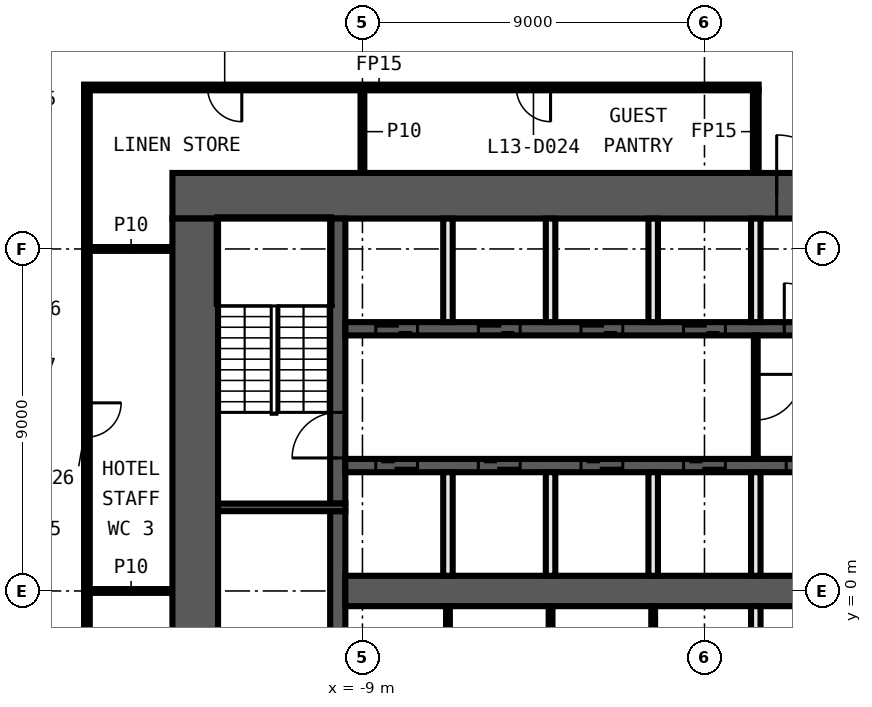
"""IFC4 building model, lengths in metres.
Left out: names, types, materials, properties, quantities, classifications, styles, units other than length and angle.
Written with IfcOpenShell. Run it as: python <this file> out.ifc"""

import sys

from ifc_helpers import new_model, si_unit, direction, frame, frame_2d, origin, place, context, subcontext, project, spatial, rectangle, extrude, element, fill, save


model = new_model("IFC4")
c1 = context("Model", 3, precision=1e-05, world=origin(), true_north=direction((0.0, 1.0)))
c2 = subcontext(c1, "Body", "Model", "MODEL_VIEW")
j1 = project(units=[si_unit("LENGTHUNIT", "METRE"), si_unit("PLANEANGLEUNIT", "RADIAN")], contexts=[c1])
p1 = place(None, origin())
s1 = spatial("IfcSite", under=j1, at=p1, CompositionType="ELEMENT")
p2 = place(p1, origin())
s2 = spatial("IfcBuilding", under=s1, at=p2, CompositionType="ELEMENT")
p3 = place(p2, frame((0.0, 0.0, 69.9)))
s3 = spatial("IfcBuildingStorey", under=s2, at=p3, CompositionType="ELEMENT", Elevation=69.9)
for number, where, z_axis, x_axis in (
    (1, (-16.175, 0.0, 0.0), (0.0, 0.0, 1.0), (1.0, 0.0, 0.0)),
    (2, (-16.175, 9.0, 0.0), (0.0, 0.0, 1.0), (1.0, 0.0, 0.0)),
):
    element("IfcWall", number, at=place(p3, frame(where, z_axis=z_axis, x_axis=x_axis)), inside=s3, PredefinedType="PARTITIONING", context=c2, shape_type="SweptSolid", body=[
        extrude(rectangle(XDim=2.175, YDim=0.1, at=frame_2d((1.087, 0.0))), origin(), (0.0, 0.0, 1.0), 3.3),
    ])
p4 = place(p3, frame((1.425, 13.25, 0.0), z_axis=(0.0, 0.0, 1.0), x_axis=(-1.0, 0.0, 0.0)))
e3 = element("IfcWall", 3, at=p4, inside=s3, PredefinedType="PARTITIONING", context=c2, shape_type="SweptSolid", body=[
    extrude(rectangle(XDim=17.75, YDim=0.15, at=frame_2d((8.875, 0.0))), origin(), (0.0, 0.0, 1.0), 3.3),
])
p5 = place(p4, frame((5.475, 0.0, 0.0)))
e4 = element("IfcOpeningElement", 4, at=p5, cuts=e3, PredefinedType="OPENING", context=c2, shape_type="SweptSolid", body=[
    extrude(rectangle(XDim=0.9, YDim=2.1, at=frame_2d((0.45, 1.05))), frame((0.0, 0.085, 0.0), z_axis=(0.0, -1.0, 0.0), x_axis=(1.0, 0.0, 0.0)), (0.0, 0.0, 1.0), 0.17),
])
p6 = place(p4, frame((13.6, 0.0, 0.0)))
e5 = element("IfcOpeningElement", 5, at=p6, cuts=e3, PredefinedType="OPENING", context=c2, shape_type="SweptSolid", body=[
    extrude(rectangle(XDim=0.9, YDim=2.1, at=frame_2d((0.45, 1.05))), frame((0.0, 0.085, 0.0), z_axis=(0.0, -1.0, 0.0), x_axis=(1.0, 0.0, 0.0)), (0.0, 0.0, 1.0), 0.17),
])
p7 = place(p3, frame((1.35, 11.0, 0.0), z_axis=(0.0, 0.0, 1.0), x_axis=(0.0, 1.0, 0.0)))
e6 = element("IfcWall", 6, at=p7, inside=s3, PredefinedType="PARTITIONING", context=c2, shape_type="SweptSolid", body=[
    extrude(rectangle(XDim=2.175, YDim=0.15, at=frame_2d((1.087, 0.0))), origin(), (0.0, 0.0, 1.0), 3.3),
])
p8 = place(p3, frame((-9.0, 11.0, 0.0), z_axis=(0.0, 0.0, 1.0), x_axis=(0.0, 1.0, 0.0)))
e7 = element("IfcWall", 7, at=p8, inside=s3, PredefinedType="PARTITIONING", context=c2, shape_type="SweptSolid", body=[
    extrude(rectangle(XDim=2.175, YDim=0.1, at=frame_2d((1.087, 0.0))), origin(), (0.0, 0.0, 1.0), 3.3),
])
p9 = place(p3, frame((-16.25, 13.175, 0.0), z_axis=(0.0, 0.0, 1.0), x_axis=(0.0, -1.0, 0.0)))
e8 = element("IfcWall", 8, at=p9, inside=s3, PredefinedType="PARTITIONING", context=c2, shape_type="SweptSolid", body=[
    extrude(rectangle(XDim=26.35, YDim=0.15, at=frame_2d((13.175, 0.0))), origin(), (0.0, 0.0, 1.0), 3.3),
])
p10 = place(p9, frame((17.225, 0.0, 0.0)))
e9 = element("IfcOpeningElement", 9, at=p10, cuts=e8, PredefinedType="OPENING", context=c2, shape_type="SweptSolid", body=[
    extrude(rectangle(XDim=0.9, YDim=2.1, at=frame_2d((0.45, 1.05))), frame((0.0, 0.085, 0.0), z_axis=(0.0, -1.0, 0.0), x_axis=(1.0, 0.0, 0.0)), (0.0, 0.0, 1.0), 0.17),
])
p11 = place(p9, frame((8.225, 0.0, 0.0)))
e10 = element("IfcOpeningElement", 10, at=p11, cuts=e8, PredefinedType="OPENING", context=c2, shape_type="SweptSolid", body=[
    extrude(rectangle(XDim=0.9, YDim=2.1, at=frame_2d((0.45, 1.05))), frame((0.0, 0.085, 0.0), z_axis=(0.0, -1.0, 0.0), x_axis=(1.0, 0.0, 0.0)), (0.0, 0.0, 1.0), 0.17),
])
p12 = place(p3, frame((-14.0, 10.4, 0.0), z_axis=(0.0, 0.0, 1.0), x_axis=(1.0, 0.0, 0.0)))
e11 = element("IfcWall", 11, at=p12, inside=s3, PredefinedType="SHEAR", context=c2, shape_type="SweptSolid", body=[
    extrude(rectangle(XDim=28.0, YDim=1.2, at=frame_2d((14.0, 0.0))), origin(), (0.0, 0.0, 1.0), 3.3),
])
p13 = place(p12, frame((15.9, 0.0, 0.0)))
e12 = element("IfcOpeningElement", 12, at=p13, cuts=e11, PredefinedType="OPENING", context=c2, shape_type="SweptSolid", body=[
    extrude(rectangle(XDim=1.6, YDim=2.1, at=frame_2d((0.8, 1.05))), frame((0.0, 0.61, 0.0), z_axis=(0.0, -1.0, 0.0), x_axis=(1.0, 0.0, 0.0)), (0.0, 0.0, 1.0), 1.22),
])
p14 = place(p3, frame((-13.4, -9.8, 0.0), z_axis=(0.0, 0.0, 1.0), x_axis=(0.0, 1.0, 0.0)))
e13 = element("IfcWall", 13, at=p14, inside=s3, PredefinedType="SHEAR", context=c2, shape_type="SweptSolid", body=[
    extrude(rectangle(XDim=19.6, YDim=1.2, at=frame_2d((9.8, 0.0))), origin(), (0.0, 0.0, 1.0), 3.3),
])
p15 = place(p3, frame((-9.65, -2.1, 0.0), z_axis=(0.0, 0.0, 1.0), x_axis=(0.0, 1.0, 0.0)))
e14 = element("IfcWall", 14, at=p15, inside=s3, PredefinedType="SHEAR", context=c2, shape_type="SweptSolid", body=[
    extrude(rectangle(XDim=4.2, YDim=0.4, at=frame_2d((2.1, 0.0))), origin(), (0.0, 0.0, 1.0), 3.3),
])
p16 = place(p3, frame((-9.65, 2.3, 0.0), z_axis=(0.0, 0.0, 1.0), x_axis=(0.0, 1.0, 0.0)))
e15 = element("IfcWall", 15, at=p16, inside=s3, PredefinedType="SHEAR", context=c2, shape_type="SweptSolid", body=[
    extrude(rectangle(XDim=7.5, YDim=0.4, at=frame_2d((3.75, 0.0))), origin(), (0.0, 0.0, 1.0), 3.3),
])
p17 = place(p16, frame((1.2, 0.0, 0.0)))
e16 = element("IfcOpeningElement", 16, at=p17, cuts=e15, PredefinedType="OPENING", context=c2, shape_type="SweptSolid", body=[
    extrude(rectangle(XDim=1.2, YDim=2.1, at=frame_2d((0.6, 1.05))), frame((0.0, 0.21, 0.0), z_axis=(0.0, -1.0, 0.0), x_axis=(1.0, 0.0, 0.0)), (0.0, 0.0, 1.0), 0.42),
])
p18 = place(p3, frame((-9.45, 2.2, 0.0), z_axis=(0.0, 0.0, 1.0), x_axis=(-1.0, 0.0, 0.0)))
e17 = element("IfcWall", 17, at=p18, inside=s3, PredefinedType="SHEAR", context=c2, shape_type="SweptSolid", body=[
    extrude(rectangle(XDim=3.35, YDim=0.2, at=frame_2d((1.675, 0.0))), origin(), (0.0, 0.0, 1.0), 3.3),
])
p19 = place(p3, frame((-9.45, 6.9, 0.0), z_axis=(0.0, 0.0, 1.0), x_axis=(1.0, 0.0, 0.0)))
e18 = element("IfcWall", 18, at=p19, inside=s3, PredefinedType="SHEAR", context=c2, shape_type="SweptSolid", body=[
    extrude(rectangle(XDim=18.9, YDim=0.35, at=frame_2d((9.45, 0.0))), origin(), (0.0, 0.0, 1.0), 3.3),
])
p20 = place(p19, frame((0.8, 0.0, 0.0)))
e19 = element("IfcOpeningElement", 19, at=p20, cuts=e18, PredefinedType="OPENING", context=c2, shape_type="SweptSolid", body=[
    extrude(rectangle(XDim=1.1, YDim=2.1, at=frame_2d((0.55, 1.05))), frame((0.0, 0.185, 0.0), z_axis=(0.0, -1.0, 0.0), x_axis=(1.0, 0.0, 0.0)), (0.0, 0.0, 1.0), 0.37),
])
p21 = place(p19, frame((3.5, 0.0, 0.0)))
e20 = element("IfcOpeningElement", 20, at=p21, cuts=e18, PredefinedType="OPENING", context=c2, shape_type="SweptSolid", body=[
    extrude(rectangle(XDim=1.1, YDim=2.1, at=frame_2d((0.55, 1.05))), frame((0.0, 0.185, 0.0), z_axis=(0.0, -1.0, 0.0), x_axis=(1.0, 0.0, 0.0)), (0.0, 0.0, 1.0), 0.37),
])
p22 = place(p19, frame((6.2, 0.0, 0.0)))
e21 = element("IfcOpeningElement", 21, at=p22, cuts=e18, PredefinedType="OPENING", context=c2, shape_type="SweptSolid", body=[
    extrude(rectangle(XDim=1.1, YDim=2.1, at=frame_2d((0.55, 1.05))), frame((0.0, 0.185, 0.0), z_axis=(0.0, -1.0, 0.0), x_axis=(1.0, 0.0, 0.0)), (0.0, 0.0, 1.0), 0.37),
])
p23 = place(p19, frame((8.9, 0.0, 0.0)))
e22 = element("IfcOpeningElement", 22, at=p23, cuts=e18, PredefinedType="OPENING", context=c2, shape_type="SweptSolid", body=[
    extrude(rectangle(XDim=1.1, YDim=2.1, at=frame_2d((0.55, 1.05))), frame((0.0, 0.185, 0.0), z_axis=(0.0, -1.0, 0.0), x_axis=(1.0, 0.0, 0.0)), (0.0, 0.0, 1.0), 0.37),
])
p24 = place(p19, frame((11.55, 0.0, 0.0)))
e23 = element("IfcOpeningElement", 23, at=p24, cuts=e18, PredefinedType="OPENING", context=c2, shape_type="SweptSolid", body=[
    extrude(rectangle(XDim=1.2, YDim=2.1, at=frame_2d((0.6, 1.05))), frame((0.0, 0.185, 0.0), z_axis=(0.0, -1.0, 0.0), x_axis=(1.0, 0.0, 0.0)), (0.0, 0.0, 1.0), 0.37),
])
p25 = place(p19, frame((14.3, 0.0, 0.0)))
e24 = element("IfcOpeningElement", 24, at=p25, cuts=e18, PredefinedType="OPENING", context=c2, shape_type="SweptSolid", body=[
    extrude(rectangle(XDim=1.1, YDim=2.1, at=frame_2d((0.55, 1.05))), frame((0.0, 0.185, 0.0), z_axis=(0.0, -1.0, 0.0), x_axis=(1.0, 0.0, 0.0)), (0.0, 0.0, 1.0), 0.37),
])
p26 = place(p19, frame((17.0, 0.0, 0.0)))
e25 = element("IfcOpeningElement", 25, at=p26, cuts=e18, PredefinedType="OPENING", context=c2, shape_type="SweptSolid", body=[
    extrude(rectangle(XDim=1.1, YDim=2.1, at=frame_2d((0.55, 1.05))), frame((0.0, 0.185, 0.0), z_axis=(0.0, -1.0, 0.0), x_axis=(1.0, 0.0, 0.0)), (0.0, 0.0, 1.0), 0.37),
])
p27 = place(p3, frame((9.45, 3.3, 0.0), z_axis=(0.0, 0.0, 1.0), x_axis=(-1.0, 0.0, 0.0)))
e26 = element("IfcWall", 26, at=p27, inside=s3, PredefinedType="SHEAR", context=c2, shape_type="SweptSolid", body=[
    extrude(rectangle(XDim=18.9, YDim=0.35, at=frame_2d((9.45, 0.0))), origin(), (0.0, 0.0, 1.0), 3.3),
])
p28 = place(p27, frame((17.0, 0.0, 0.0)))
e27 = element("IfcOpeningElement", 27, at=p28, cuts=e26, PredefinedType="OPENING", context=c2, shape_type="SweptSolid", body=[
    extrude(rectangle(XDim=1.1, YDim=2.1, at=frame_2d((0.55, 1.05))), frame((0.0, 0.185, 0.0), z_axis=(0.0, -1.0, 0.0), x_axis=(1.0, 0.0, 0.0)), (0.0, 0.0, 1.0), 0.37),
])
p29 = place(p27, frame((14.3, 0.0, 0.0)))
e28 = element("IfcOpeningElement", 28, at=p29, cuts=e26, PredefinedType="OPENING", context=c2, shape_type="SweptSolid", body=[
    extrude(rectangle(XDim=1.1, YDim=2.1, at=frame_2d((0.55, 1.05))), frame((0.0, 0.185, 0.0), z_axis=(0.0, -1.0, 0.0), x_axis=(1.0, 0.0, 0.0)), (0.0, 0.0, 1.0), 0.37),
])
p30 = place(p27, frame((11.6, 0.0, 0.0)))
e29 = element("IfcOpeningElement", 29, at=p30, cuts=e26, PredefinedType="OPENING", context=c2, shape_type="SweptSolid", body=[
    extrude(rectangle(XDim=1.1, YDim=2.1, at=frame_2d((0.55, 1.05))), frame((0.0, 0.185, 0.0), z_axis=(0.0, -1.0, 0.0), x_axis=(1.0, 0.0, 0.0)), (0.0, 0.0, 1.0), 0.37),
])
p31 = place(p27, frame((8.9, 0.0, 0.0)))
e30 = element("IfcOpeningElement", 30, at=p31, cuts=e26, PredefinedType="OPENING", context=c2, shape_type="SweptSolid", body=[
    extrude(rectangle(XDim=1.1, YDim=2.1, at=frame_2d((0.55, 1.05))), frame((0.0, 0.185, 0.0), z_axis=(0.0, -1.0, 0.0), x_axis=(1.0, 0.0, 0.0)), (0.0, 0.0, 1.0), 0.37),
])
p32 = place(p27, frame((6.2, 0.0, 0.0)))
e31 = element("IfcOpeningElement", 31, at=p32, cuts=e26, PredefinedType="OPENING", context=c2, shape_type="SweptSolid", body=[
    extrude(rectangle(XDim=1.1, YDim=2.1, at=frame_2d((0.55, 1.05))), frame((0.0, 0.185, 0.0), z_axis=(0.0, -1.0, 0.0), x_axis=(1.0, 0.0, 0.0)), (0.0, 0.0, 1.0), 0.37),
])
p33 = place(p27, frame((3.5, 0.0, 0.0)))
e32 = element("IfcOpeningElement", 32, at=p33, cuts=e26, PredefinedType="OPENING", context=c2, shape_type="SweptSolid", body=[
    extrude(rectangle(XDim=1.1, YDim=2.1, at=frame_2d((0.55, 1.05))), frame((0.0, 0.185, 0.0), z_axis=(0.0, -1.0, 0.0), x_axis=(1.0, 0.0, 0.0)), (0.0, 0.0, 1.0), 0.37),
])
p34 = place(p27, frame((0.9, 0.0, 0.0)))
e33 = element("IfcOpeningElement", 33, at=p34, cuts=e26, PredefinedType="OPENING", context=c2, shape_type="SweptSolid", body=[
    extrude(rectangle(XDim=0.9, YDim=2.1, at=frame_2d((0.45, 1.05))), frame((0.0, 0.185, 0.0), z_axis=(0.0, -1.0, 0.0), x_axis=(1.0, 0.0, 0.0)), (0.0, 0.0, 1.0), 0.37),
])
p35 = place(p3, frame((-9.45, 0.0, 0.0), z_axis=(0.0, 0.0, 1.0), x_axis=(1.0, 0.0, 0.0)))
e34 = element("IfcWall", 34, at=p35, inside=s3, PredefinedType="SHEAR", context=c2, shape_type="SweptSolid", body=[
    extrude(rectangle(XDim=18.9, YDim=0.8, at=frame_2d((9.45, 0.0))), origin(), (0.0, 0.0, 1.0), 3.3),
])
p36 = place(p3, frame((1.35, 6.725, 0.0), z_axis=(0.0, 0.0, 1.0), x_axis=(0.0, -1.0, 0.0)))
e35 = element("IfcWall", 35, at=p36, inside=s3, PredefinedType="PARTITIONING", context=c2, shape_type="SweptSolid", body=[
    extrude(rectangle(XDim=3.25, YDim=0.1, at=frame_2d((1.625, 0.0))), origin(), (0.0, 0.0, 1.0), 3.3),
])
p37 = place(p36, frame((1.025, 0.0, 0.0)))
e36 = element("IfcOpeningElement", 36, at=p37, cuts=e35, PredefinedType="OPENING", context=c2, shape_type="SweptSolid", body=[
    extrude(rectangle(XDim=1.2, YDim=2.1, at=frame_2d((0.6, 1.05))), frame((0.0, 0.06, 0.0), z_axis=(0.0, -1.0, 0.0), x_axis=(1.0, 0.0, 0.0)), (0.0, 0.0, 1.0), 0.12),
])
for number, where, z_axis, x_axis in (
    (37, (1.35, -3.125, 0.0), (0.0, 0.0, 1.0), (0.0, 1.0, 0.0)),
    (38, (1.35, 0.4, 0.0), (0.0, 0.0, 1.0), (0.0, 1.0, 0.0)),
    (39, (1.35, 7.075, 0.0), (0.0, 0.0, 1.0), (0.0, 1.0, 0.0)),
):
    element("IfcWall", number, at=place(p3, frame(where, z_axis=z_axis, x_axis=x_axis)), inside=s3, PredefinedType="SOLIDWALL", context=c2, shape_type="SweptSolid", body=[
        extrude(rectangle(XDim=2.725, YDim=0.25, at=frame_2d((1.363, 0.0))), origin(), (0.0, 0.0, 1.0), 3.3),
    ])
p38 = place(p3, frame((-1.35, -3.125, 0.0), z_axis=(0.0, 0.0, 1.0), x_axis=(0.0, 1.0, 0.0)))
e40 = element("IfcWall", 40, at=p38, inside=s3, PredefinedType="PARTITIONING", context=c2, shape_type="SweptSolid", body=[
    extrude(rectangle(XDim=2.725, YDim=0.1, at=frame_2d((1.363, 0.0))), origin(), (0.0, 0.0, 1.0), 3.3),
])
for number, where, z_axis, x_axis in (
    (41, (-1.35, 0.4, 0.0), (0.0, 0.0, 1.0), (0.0, 1.0, 0.0)),
    (42, (-1.35, 7.075, 0.0), (0.0, 0.0, 1.0), (0.0, 1.0, 0.0)),
):
    element("IfcWall", number, at=place(p3, frame(where, z_axis=z_axis, x_axis=x_axis)), inside=s3, PredefinedType="SOLIDWALL", context=c2, shape_type="SweptSolid", body=[
        extrude(rectangle(XDim=2.725, YDim=0.25, at=frame_2d((1.363, 0.0))), origin(), (0.0, 0.0, 1.0), 3.3),
    ])
p39 = place(p3, frame((-4.05, -3.125, 0.0), z_axis=(0.0, 0.0, 1.0), x_axis=(0.0, 1.0, 0.0)))
e43 = element("IfcWall", 43, at=p39, inside=s3, PredefinedType="PARTITIONING", context=c2, shape_type="SweptSolid", body=[
    extrude(rectangle(XDim=2.725, YDim=0.1, at=frame_2d((1.363, 0.0))), origin(), (0.0, 0.0, 1.0), 3.3),
])
for number, where, z_axis, x_axis in (
    (44, (-4.05, 0.4, 0.0), (0.0, 0.0, 1.0), (0.0, 1.0, 0.0)),
    (45, (-4.05, 7.075, 0.0), (0.0, 0.0, 1.0), (0.0, 1.0, 0.0)),
):
    element("IfcWall", number, at=place(p3, frame(where, z_axis=z_axis, x_axis=x_axis)), inside=s3, PredefinedType="SOLIDWALL", context=c2, shape_type="SweptSolid", body=[
        extrude(rectangle(XDim=2.725, YDim=0.25, at=frame_2d((1.363, 0.0))), origin(), (0.0, 0.0, 1.0), 3.3),
    ])
p40 = place(p3, frame((-6.75, -3.125, 0.0), z_axis=(0.0, 0.0, 1.0), x_axis=(0.0, 1.0, 0.0)))
e46 = element("IfcWall", 46, at=p40, inside=s3, PredefinedType="PARTITIONING", context=c2, shape_type="SweptSolid", body=[
    extrude(rectangle(XDim=2.725, YDim=0.1, at=frame_2d((1.363, 0.0))), origin(), (0.0, 0.0, 1.0), 3.3),
])
for number, where, z_axis, x_axis in (
    (47, (-6.75, 0.4, 0.0), (0.0, 0.0, 1.0), (0.0, 1.0, 0.0)),
    (48, (-6.75, 7.075, 0.0), (0.0, 0.0, 1.0), (0.0, 1.0, 0.0)),
):
    element("IfcWall", number, at=place(p3, frame(where, z_axis=z_axis, x_axis=x_axis)), inside=s3, PredefinedType="SOLIDWALL", context=c2, shape_type="SweptSolid", body=[
        extrude(rectangle(XDim=2.725, YDim=0.25, at=frame_2d((1.363, 0.0))), origin(), (0.0, 0.0, 1.0), 3.3),
    ])
p41 = place(p5, origin())
e49 = element("IfcDoor", 49, at=p41, inside=s3, OperationType="SINGLE_SWING_RIGHT", PredefinedType="DOOR", context=c2, shape_type="SweptSolid", body=[
    extrude(rectangle(XDim=0.9, YDim=2.1, at=frame_2d((0.45, 1.05))), frame((0.0, 0.025, 0.0), z_axis=(0.0, -1.0, 0.0), x_axis=(1.0, 0.0, 0.0)), (0.0, 0.0, 1.0), 0.05),
])
fill(e4, e49)
p42 = place(p6, origin())
e50 = element("IfcDoor", 50, at=p42, inside=s3, OperationType="SINGLE_SWING_LEFT", PredefinedType="DOOR", context=c2, shape_type="SweptSolid", body=[
    extrude(rectangle(XDim=0.9, YDim=2.1, at=frame_2d((0.45, 1.05))), frame((0.0, 0.025, 0.0), z_axis=(0.0, -1.0, 0.0), x_axis=(1.0, 0.0, 0.0)), (0.0, 0.0, 1.0), 0.05),
])
fill(e5, e50)
p43 = place(p11, origin())
e51 = element("IfcDoor", 51, at=p43, inside=s3, OperationType="SINGLE_SWING_RIGHT", PredefinedType="DOOR", context=c2, shape_type="SweptSolid", body=[
    extrude(rectangle(XDim=0.9, YDim=2.1, at=frame_2d((0.45, 1.05))), frame((0.0, 0.025, 0.0), z_axis=(0.0, -1.0, 0.0), x_axis=(1.0, 0.0, 0.0)), (0.0, 0.0, 1.0), 0.05),
])
fill(e10, e51)
p44 = place(p20, origin())
e52 = element("IfcDoor", 52, at=p44, inside=s3, OperationType="DOUBLE_DOOR_SLIDING", PredefinedType="DOOR", context=c2, shape_type="SweptSolid", body=[
    extrude(rectangle(XDim=1.1, YDim=2.1, at=frame_2d((0.55, 1.05))), frame((0.0, 0.025, 0.0), z_axis=(0.0, -1.0, 0.0), x_axis=(1.0, 0.0, 0.0)), (0.0, 0.0, 1.0), 0.05),
])
fill(e19, e52)
p45 = place(p21, origin())
e53 = element("IfcDoor", 53, at=p45, inside=s3, OperationType="DOUBLE_DOOR_SLIDING", PredefinedType="DOOR", context=c2, shape_type="SweptSolid", body=[
    extrude(rectangle(XDim=1.1, YDim=2.1, at=frame_2d((0.55, 1.05))), frame((0.0, 0.025, 0.0), z_axis=(0.0, -1.0, 0.0), x_axis=(1.0, 0.0, 0.0)), (0.0, 0.0, 1.0), 0.05),
])
fill(e20, e53)
p46 = place(p22, origin())
e54 = element("IfcDoor", 54, at=p46, inside=s3, OperationType="DOUBLE_DOOR_SLIDING", PredefinedType="DOOR", context=c2, shape_type="SweptSolid", body=[
    extrude(rectangle(XDim=1.1, YDim=2.1, at=frame_2d((0.55, 1.05))), frame((0.0, 0.025, 0.0), z_axis=(0.0, -1.0, 0.0), x_axis=(1.0, 0.0, 0.0)), (0.0, 0.0, 1.0), 0.05),
])
fill(e21, e54)
p47 = place(p23, origin())
e55 = element("IfcDoor", 55, at=p47, inside=s3, OperationType="DOUBLE_DOOR_SLIDING", PredefinedType="DOOR", context=c2, shape_type="SweptSolid", body=[
    extrude(rectangle(XDim=1.1, YDim=2.1, at=frame_2d((0.55, 1.05))), frame((0.0, 0.025, 0.0), z_axis=(0.0, -1.0, 0.0), x_axis=(1.0, 0.0, 0.0)), (0.0, 0.0, 1.0), 0.05),
])
fill(e22, e55)
p48 = place(p13, origin())
e56 = element("IfcDoor", 56, at=p48, inside=s3, OperationType="DOUBLE_DOOR_SINGLE_SWING", PredefinedType="DOOR", context=c2, shape_type="SweptSolid", body=[
    extrude(rectangle(XDim=1.6, YDim=2.1, at=frame_2d((0.8, 1.05))), frame((0.0, 0.025, 0.0), z_axis=(0.0, -1.0, 0.0), x_axis=(1.0, 0.0, 0.0)), (0.0, 0.0, 1.0), 0.05),
])
fill(e12, e56)
p49 = place(p24, origin())
e57 = element("IfcDoor", 57, at=p49, inside=s3, OperationType="SINGLE_SWING_LEFT", PredefinedType="DOOR", context=c2, shape_type="SweptSolid", body=[
    extrude(rectangle(XDim=1.2, YDim=2.1, at=frame_2d((0.6, 1.05))), frame((0.0, 0.025, 0.0), z_axis=(0.0, -1.0, 0.0), x_axis=(1.0, 0.0, 0.0)), (0.0, 0.0, 1.0), 0.05),
])
fill(e23, e57)
p50 = place(p28, origin())
e58 = element("IfcDoor", 58, at=p50, inside=s3, OperationType="DOUBLE_DOOR_SLIDING", PredefinedType="DOOR", context=c2, shape_type="SweptSolid", body=[
    extrude(rectangle(XDim=1.1, YDim=2.1, at=frame_2d((0.55, 1.05))), frame((0.0, 0.025, 0.0), z_axis=(0.0, -1.0, 0.0), x_axis=(1.0, 0.0, 0.0)), (0.0, 0.0, 1.0), 0.05),
])
fill(e27, e58)
p51 = place(p29, origin())
e59 = element("IfcDoor", 59, at=p51, inside=s3, OperationType="DOUBLE_DOOR_SLIDING", PredefinedType="DOOR", context=c2, shape_type="SweptSolid", body=[
    extrude(rectangle(XDim=1.1, YDim=2.1, at=frame_2d((0.55, 1.05))), frame((0.0, 0.025, 0.0), z_axis=(0.0, -1.0, 0.0), x_axis=(1.0, 0.0, 0.0)), (0.0, 0.0, 1.0), 0.05),
])
fill(e28, e59)
p52 = place(p30, origin())
e60 = element("IfcDoor", 60, at=p52, inside=s3, OperationType="DOUBLE_DOOR_SLIDING", PredefinedType="DOOR", context=c2, shape_type="SweptSolid", body=[
    extrude(rectangle(XDim=1.1, YDim=2.1, at=frame_2d((0.55, 1.05))), frame((0.0, 0.025, 0.0), z_axis=(0.0, -1.0, 0.0), x_axis=(1.0, 0.0, 0.0)), (0.0, 0.0, 1.0), 0.05),
])
fill(e29, e60)
p53 = place(p31, origin())
e61 = element("IfcDoor", 61, at=p53, inside=s3, OperationType="DOUBLE_DOOR_SLIDING", PredefinedType="DOOR", context=c2, shape_type="SweptSolid", body=[
    extrude(rectangle(XDim=1.1, YDim=2.1, at=frame_2d((0.55, 1.05))), frame((0.0, 0.025, 0.0), z_axis=(0.0, -1.0, 0.0), x_axis=(1.0, 0.0, 0.0)), (0.0, 0.0, 1.0), 0.05),
])
fill(e30, e61)
p54 = place(p32, origin())
e62 = element("IfcDoor", 62, at=p54, inside=s3, OperationType="DOUBLE_DOOR_SLIDING", PredefinedType="DOOR", context=c2, shape_type="SweptSolid", body=[
    extrude(rectangle(XDim=1.1, YDim=2.1, at=frame_2d((0.55, 1.05))), frame((0.0, 0.025, 0.0), z_axis=(0.0, -1.0, 0.0), x_axis=(1.0, 0.0, 0.0)), (0.0, 0.0, 1.0), 0.05),
])
fill(e31, e62)
p55 = place(p17, origin())
e63 = element("IfcDoor", 63, at=p55, inside=s3, OperationType="SINGLE_SWING_RIGHT", PredefinedType="DOOR", context=c2, shape_type="SweptSolid", body=[
    extrude(rectangle(XDim=1.2, YDim=2.1, at=frame_2d((0.6, 1.05))), frame((0.0, 0.025, 0.0), z_axis=(0.0, -1.0, 0.0), x_axis=(1.0, 0.0, 0.0)), (0.0, 0.0, 1.0), 0.05),
])
fill(e16, e63)
p56 = place(p37, origin())
e64 = element("IfcDoor", 64, at=p56, inside=s3, OperationType="SINGLE_SWING_LEFT", PredefinedType="DOOR", context=c2, shape_type="SweptSolid", body=[
    extrude(rectangle(XDim=1.2, YDim=2.1, at=frame_2d((0.6, 1.05))), frame((0.0, 0.025, 0.0), z_axis=(0.0, -1.0, 0.0), x_axis=(1.0, 0.0, 0.0)), (0.0, 0.0, 1.0), 0.05),
])
fill(e36, e64)
save(model, sys.argv[1])
